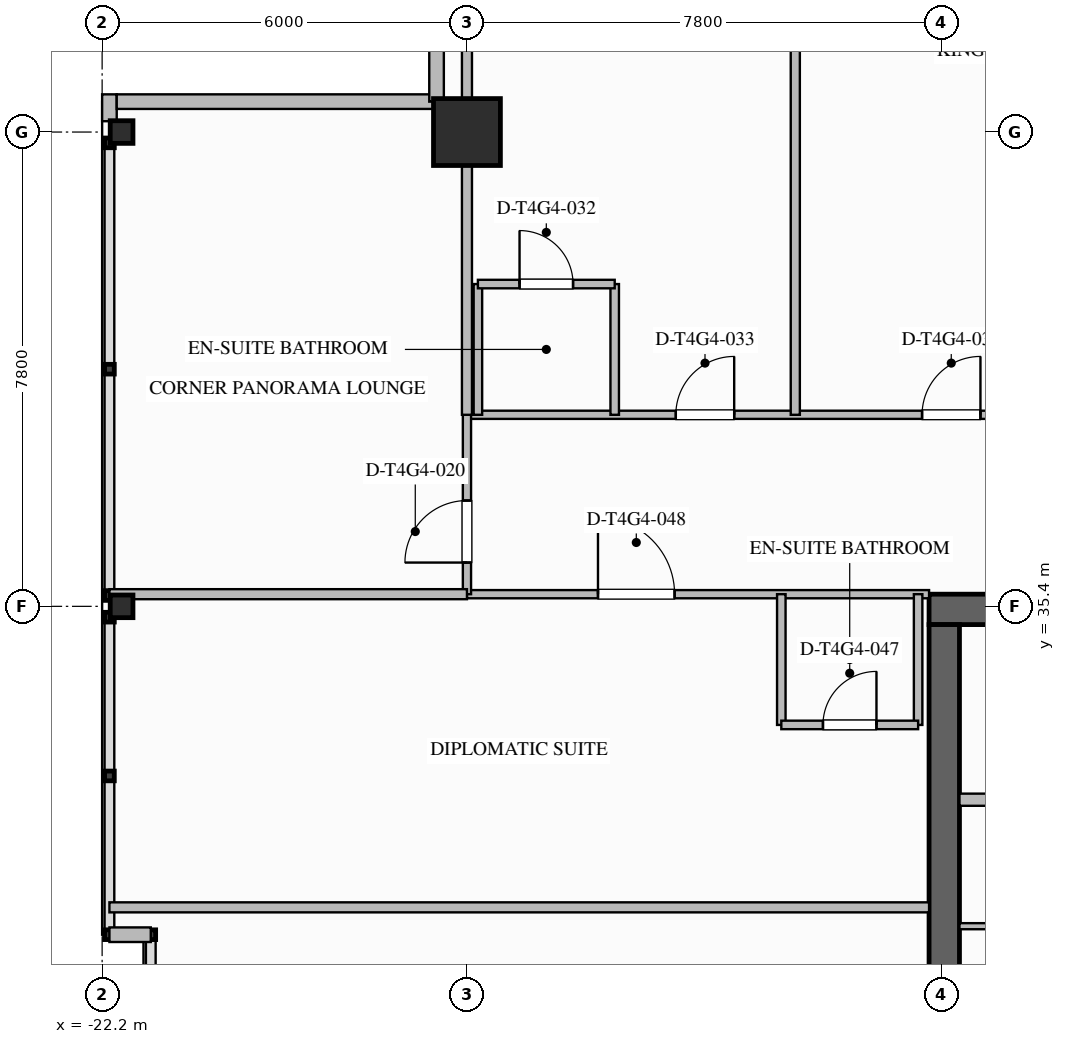
"""IFC4 building model, lengths in metres.
Left out: names, types, materials, properties, quantities, classifications, styles, units other than length and angle.
Written with IfcOpenShell. Run it as: python <this file> out.ifc"""

import sys

from ifc_helpers import new_model, si_unit, direction, frame, frame_2d, origin, origin_2d, place, context, subcontext, project, spatial, rectangle, i_section, extrude, element, fill, save


model = new_model("IFC4")
c1 = context("Model", 3, precision=1e-05, world=origin(), true_north=direction((0.0, 1.0)))
c2 = subcontext(c1, "Body", "Model", "MODEL_VIEW")
j1 = project(units=[si_unit("LENGTHUNIT", "METRE"), si_unit("PLANEANGLEUNIT", "RADIAN")], contexts=[c1])
p1 = place(None, origin())
s1 = spatial("IfcSite", under=j1, at=p1, CompositionType="ELEMENT")
p2 = place(p1, origin())
s2 = spatial("IfcBuilding", under=s1, at=p2, CompositionType="ELEMENT")
p3 = place(p2, frame((0.0, 0.0, 237.5)))
s3 = spatial("IfcBuildingStorey", under=s2, at=p3, CompositionType="ELEMENT", Elevation=237.5)
p4 = place(p3, frame((-8.6, 35.35, 0.0), z_axis=(0.0, 0.0, 1.0), x_axis=(1.0, 0.0, 0.0)))
e1 = element("IfcWall", 1, at=p4, inside=s3, PredefinedType="SHEAR", context=c2, shape_type="SweptSolid", body=[
    extrude(rectangle(XDim=17.2, YDim=0.5, at=frame_2d((8.6, 0.0))), origin(), (0.0, 0.0, 1.0), 3.6),
])
p5 = place(p3, frame((-8.35, 18.9, 0.0), z_axis=(0.0, 0.0, 1.0), x_axis=(0.0, 1.0, 0.0)))
e2 = element("IfcWall", 2, at=p5, inside=s3, PredefinedType="SHEAR", context=c2, shape_type="SweptSolid", body=[
    extrude(rectangle(XDim=16.2, YDim=0.5, at=frame_2d((8.1, 0.0))), origin(), (0.0, 0.0, 1.0), 3.6),
])
p6 = place(p3, frame((-16.2, 43.2, 0.0), z_axis=(0.0, 0.0, 1.0), x_axis=(1.0, 0.0, 0.0)))
e3 = element("IfcColumn", 3, at=p6, inside=s3, PredefinedType="COLUMN", context=c2, shape_type="SweptSolid", body=[
    extrude(rectangle(XDim=1.1, YDim=1.1, at=origin_2d()), origin(), (0.0, 0.0, 1.0), 3.6),
])
for number, where, z_axis, x_axis in (
    (4, (-21.88, 35.4, 0.0), (0.0, 0.0, 1.0), (1.0, 0.0, 0.0)),
    (5, (-21.88, 43.2, 0.0), (0.0, 0.0, 1.0), (1.0, 0.0, 0.0)),
):
    element("IfcColumn", number, at=place(p3, frame(where, z_axis=z_axis, x_axis=x_axis)), inside=s3, PredefinedType="COLUMN", context=c2, shape_type="SweptSolid", body=[
        extrude(i_section(OverallWidth=0.374, OverallDepth=0.372, WebThickness=0.016, FlangeThickness=0.026, FilletRadius=0.025, at=origin_2d()), origin(), (0.0, 0.0, 1.0), 3.597),
    ])
p7 = place(p3, frame((-22.08, 43.378, 0.0), z_axis=(0.0, 0.0, 1.0), x_axis=(0.0, 1.0, 0.0)))
e6 = element("IfcWall", 6, at=p7, inside=s3, PredefinedType="STANDARD", context=c2, shape_type="SweptSolid", body=[
    extrude(rectangle(XDim=0.442, YDim=0.24, at=frame_2d((0.221, 0.0))), origin(), (0.0, 0.0, 1.0), 3.34),
])
for number, where, z_axis, x_axis in (
    (7, (-21.96, 43.7, 0.0), (0.0, 0.0, 1.0), (1.0, 0.0, 0.0)),
    (8, (-16.7, 43.7, 0.0), (0.0, 0.0, 1.0), (0.0, 1.0, 0.0)),
):
    element("IfcWall", number, at=place(p3, frame(where, z_axis=z_axis, x_axis=x_axis)), inside=s3, PredefinedType="STANDARD", context=c2, shape_type="SweptSolid", body=[
        extrude(rectangle(XDim=5.26, YDim=0.24, at=frame_2d((2.63, 0.0))), origin(), (0.0, 0.0, 1.0), 3.34),
    ])
p8 = place(p3, frame((-21.4, 30.0, 0.0), z_axis=(0.0, 0.0, 1.0), x_axis=(-1.0, 0.0, 0.0)))
e9 = element("IfcWall", 9, at=p8, inside=s3, PredefinedType="STANDARD", context=c2, shape_type="SweptSolid", body=[
    extrude(rectangle(XDim=0.68, YDim=0.24, at=frame_2d((0.34, 0.0))), origin(), (0.0, 0.0, 1.0), 3.34),
])
p9 = place(p3, frame((-8.1, 32.22, 0.0), z_axis=(0.0, 0.0, 1.0), x_axis=(1.0, 0.0, 0.0)))
e10 = element("IfcWall", 10, at=p9, inside=s3, PredefinedType="SOLIDWALL", context=c2, shape_type="SweptSolid", body=[
    extrude(rectangle(XDim=7.1, YDim=0.2, at=frame_2d((3.55, 0.0))), origin(), (0.0, 0.0, 1.0), 3.34),
])
p10 = place(p9, frame((0.95, 0.0, 0.0)))
e11 = element("IfcOpeningElement", 11, at=p10, cuts=e10, PredefinedType="OPENING", context=c2, shape_type="SweptSolid", body=[
    extrude(rectangle(XDim=1.1, YDim=2.2, at=frame_2d((0.55, 1.1))), frame((0.0, 0.11, 0.0), z_axis=(0.0, -1.0, 0.0), x_axis=(1.0, 0.0, 0.0)), (0.0, 0.0, 1.0), 0.22),
])
p11 = place(p9, frame((3.27, 0.0, 0.0)))
e12 = element("IfcOpeningElement", 12, at=p11, cuts=e10, PredefinedType="OPENING", context=c2, shape_type="SweptSolid", body=[
    extrude(rectangle(XDim=1.1, YDim=2.2, at=frame_2d((0.55, 1.1))), frame((0.0, 0.11, 0.0), z_axis=(0.0, -1.0, 0.0), x_axis=(1.0, 0.0, 0.0)), (0.0, 0.0, 1.0), 0.22),
])
p12 = place(p9, frame((5.59, 0.0, 0.0)))
e13 = element("IfcOpeningElement", 13, at=p12, cuts=e10, PredefinedType="OPENING", context=c2, shape_type="SweptSolid", body=[
    extrude(rectangle(XDim=1.1, YDim=2.2, at=frame_2d((0.55, 1.1))), frame((0.0, 0.11, 0.0), z_axis=(0.0, -1.0, 0.0), x_axis=(1.0, 0.0, 0.0)), (0.0, 0.0, 1.0), 0.22),
])
p13 = place(p3, frame((-8.1, 30.14, 0.0), z_axis=(0.0, 0.0, 1.0), x_axis=(1.0, 0.0, 0.0)))
e14 = element("IfcWall", 14, at=p13, inside=s3, PredefinedType="PARTITIONING", context=c2, shape_type="SweptSolid", body=[
    extrude(rectangle(XDim=7.1, YDim=0.1, at=frame_2d((3.55, 0.0))), origin(), (0.0, 0.0, 1.0), 3.34),
])
p14 = place(p13, frame((1.1, 0.0, 0.0)))
e15 = element("IfcOpeningElement", 15, at=p14, cuts=e14, PredefinedType="OPENING", context=c2, shape_type="SweptSolid", body=[
    extrude(rectangle(XDim=0.92, YDim=2.1, at=frame_2d((0.46, 1.05))), frame((0.0, 0.06, 0.0), z_axis=(0.0, -1.0, 0.0), x_axis=(1.0, 0.0, 0.0)), (0.0, 0.0, 1.0), 0.12),
])
p15 = place(p13, frame((4.6, 0.0, 0.0)))
e16 = element("IfcOpeningElement", 16, at=p15, cuts=e14, PredefinedType="OPENING", context=c2, shape_type="SweptSolid", body=[
    extrude(rectangle(XDim=0.92, YDim=2.1, at=frame_2d((0.46, 1.05))), frame((0.0, 0.06, 0.0), z_axis=(0.0, -1.0, 0.0), x_axis=(1.0, 0.0, 0.0)), (0.0, 0.0, 1.0), 0.12),
])
p16 = place(p3, frame((-16.2, 38.55, 0.0), z_axis=(0.0, 0.0, 1.0), x_axis=(1.0, 0.0, 0.0)))
e17 = element("IfcWall", 17, at=p16, inside=s3, PredefinedType="PARTITIONING", context=c2, shape_type="SweptSolid", body=[
    extrude(rectangle(XDim=38.28, YDim=0.135, at=frame_2d((19.14, 0.0))), origin(), (0.0, 0.0, 1.0), 3.34),
])
p17 = place(p16, frame((33.355, 0.0, 0.0)))
e18 = element("IfcOpeningElement", 18, at=p17, cuts=e17, PredefinedType="OPENING", context=c2, shape_type="SweptSolid", body=[
    extrude(rectangle(XDim=1.26, YDim=2.2, at=frame_2d((0.63, 1.1))), frame((0.0, 0.077, 0.0), z_axis=(0.0, -1.0, 0.0), x_axis=(1.0, 0.0, 0.0)), (0.0, 0.0, 1.0), 0.155),
])
p18 = place(p16, frame((3.435, 0.0, 0.0)))
e19 = element("IfcOpeningElement", 19, at=p18, cuts=e17, PredefinedType="OPENING", context=c2, shape_type="SweptSolid", body=[
    extrude(rectangle(XDim=0.96, YDim=2.15, at=frame_2d((0.48, 1.075))), frame((0.0, 0.077, 0.0), z_axis=(0.0, -1.0, 0.0), x_axis=(1.0, 0.0, 0.0)), (0.0, 0.0, 1.0), 0.155),
])
p19 = place(p16, frame((7.485, 0.0, 0.0)))
e20 = element("IfcOpeningElement", 20, at=p19, cuts=e17, PredefinedType="OPENING", context=c2, shape_type="SweptSolid", body=[
    extrude(rectangle(XDim=0.96, YDim=2.15, at=frame_2d((0.48, 1.075))), frame((0.0, 0.077, 0.0), z_axis=(0.0, -1.0, 0.0), x_axis=(1.0, 0.0, 0.0)), (0.0, 0.0, 1.0), 0.155),
])
p20 = place(p16, frame((15.69, 0.0, 0.0)))
e21 = element("IfcOpeningElement", 21, at=p20, cuts=e17, PredefinedType="OPENING", context=c2, shape_type="SweptSolid", body=[
    extrude(rectangle(XDim=1.02, YDim=2.15, at=frame_2d((0.51, 1.075))), frame((0.0, 0.077, 0.0), z_axis=(0.0, -1.0, 0.0), x_axis=(1.0, 0.0, 0.0)), (0.0, 0.0, 1.0), 0.155),
])
p21 = place(p16, frame((21.525, 0.0, 0.0)))
e22 = element("IfcOpeningElement", 22, at=p21, cuts=e17, PredefinedType="OPENING", context=c2, shape_type="SweptSolid", body=[
    extrude(rectangle(XDim=0.96, YDim=2.15, at=frame_2d((0.48, 1.075))), frame((0.0, 0.077, 0.0), z_axis=(0.0, -1.0, 0.0), x_axis=(1.0, 0.0, 0.0)), (0.0, 0.0, 1.0), 0.155),
])
p22 = place(p16, frame((30.435, 0.0, 0.0)))
e23 = element("IfcOpeningElement", 23, at=p22, cuts=e17, PredefinedType="OPENING", context=c2, shape_type="SweptSolid", body=[
    extrude(rectangle(XDim=0.96, YDim=2.15, at=frame_2d((0.48, 1.075))), frame((0.0, 0.077, 0.0), z_axis=(0.0, -1.0, 0.0), x_axis=(1.0, 0.0, 0.0)), (0.0, 0.0, 1.0), 0.155),
])
p23 = place(p3, frame((-16.2, 35.6, 0.0), z_axis=(0.0, 0.0, 1.0), x_axis=(1.0, 0.0, 0.0)))
e24 = element("IfcWall", 24, at=p23, inside=s3, PredefinedType="PARTITIONING", context=c2, shape_type="SweptSolid", body=[
    extrude(rectangle(XDim=7.6, YDim=0.135, at=frame_2d((3.8, 0.0))), origin(), (0.0, 0.0, 1.0), 2.717),
])
p24 = place(p23, frame((2.155, 0.0, 0.0)))
e25 = element("IfcOpeningElement", 25, at=p24, cuts=e24, PredefinedType="OPENING", context=c2, shape_type="SweptSolid", body=[
    extrude(rectangle(XDim=1.26, YDim=2.2, at=frame_2d((0.63, 1.1))), frame((0.0, 0.077, 0.0), z_axis=(0.0, -1.0, 0.0), x_axis=(1.0, 0.0, 0.0)), (0.0, 0.0, 1.0), 0.155),
])
p25 = place(p3, frame((-16.2, 35.6, 0.0), z_axis=(0.0, 0.0, 1.0), x_axis=(0.0, 1.0, 0.0)))
e26 = element("IfcWall", 26, at=p25, inside=s3, PredefinedType="PARTITIONING", context=c2, shape_type="SweptSolid", body=[
    extrude(rectangle(XDim=2.95, YDim=0.135, at=frame_2d((1.475, 0.0))), origin(), (0.0, 0.0, 1.0), 2.714),
])
p26 = place(p25, frame((0.52, 0.0, 0.0)))
e27 = element("IfcOpeningElement", 27, at=p26, cuts=e26, PredefinedType="OPENING", context=c2, shape_type="SweptSolid", body=[
    extrude(rectangle(XDim=1.02, YDim=2.15, at=frame_2d((0.51, 1.075))), frame((0.0, 0.077, 0.0), z_axis=(0.0, -1.0, 0.0), x_axis=(1.0, 0.0, 0.0)), (0.0, 0.0, 1.0), 0.155),
])
p27 = place(p3, frame((-16.2, 38.55, 0.0), z_axis=(0.0, 0.0, 1.0), x_axis=(0.0, 1.0, 0.0)))
e28 = element("IfcWall", 28, at=p27, inside=s3, PredefinedType="PARTITIONING", context=c2, shape_type="SweptSolid", body=[
    extrude(rectangle(XDim=10.53, YDim=0.165, at=frame_2d((5.265, 0.0))), origin(), (0.0, 0.0, 1.0), 2.714),
])
p28 = place(p3, frame((-22.08, 35.6, 0.0), z_axis=(0.0, 0.0, 1.0), x_axis=(1.0, 0.0, 0.0)))
e29 = element("IfcWall", 29, at=p28, inside=s3, PredefinedType="PARTITIONING", context=c2, shape_type="SweptSolid", body=[
    extrude(rectangle(XDim=5.88, YDim=0.165, at=frame_2d((2.94, 0.0))), origin(), (0.0, 0.0, 1.0), 2.714),
])
p29 = place(p3, frame((-16.02, 38.55, 0.0), z_axis=(0.0, 0.0, 1.0), x_axis=(0.0, 1.0, 0.0)))
e30 = element("IfcWall", 30, at=p29, inside=s3, PredefinedType="PLUMBINGWALL", context=c2, shape_type="SweptSolid", body=[
    extrude(rectangle(XDim=2.15, YDim=0.14, at=frame_2d((1.075, 0.0))), origin(), (0.0, 0.0, 1.0), 2.714),
])
p30 = place(p3, frame((-13.77, 38.55, 0.0), z_axis=(0.0, 0.0, 1.0), x_axis=(0.0, 1.0, 0.0)))
e31 = element("IfcWall", 31, at=p30, inside=s3, PredefinedType="PLUMBINGWALL", context=c2, shape_type="SweptSolid", body=[
    extrude(rectangle(XDim=2.15, YDim=0.14, at=frame_2d((1.075, 0.0))), origin(), (0.0, 0.0, 1.0), 3.34),
])
p31 = place(p3, frame((-16.02, 40.7, 0.0), z_axis=(0.0, 0.0, 1.0), x_axis=(1.0, 0.0, 0.0)))
e32 = element("IfcWall", 32, at=p31, inside=s3, PredefinedType="PLUMBINGWALL", context=c2, shape_type="SweptSolid", body=[
    extrude(rectangle(XDim=2.25, YDim=0.14, at=frame_2d((1.125, 0.0))), origin(), (0.0, 0.0, 1.0), 3.34),
])
p32 = place(p31, frame((0.685, 0.0, 0.0)))
e33 = element("IfcOpeningElement", 33, at=p32, cuts=e32, PredefinedType="OPENING", context=c2, shape_type="SweptSolid", body=[
    extrude(rectangle(XDim=0.88, YDim=2.1, at=frame_2d((0.44, 1.05))), frame((0.0, 0.08, 0.0), z_axis=(0.0, -1.0, 0.0), x_axis=(1.0, 0.0, 0.0)), (0.0, 0.0, 1.0), 0.16),
])
p33 = place(p3, frame((-10.8, 38.55, 0.0), z_axis=(0.0, 0.0, 1.0), x_axis=(0.0, 1.0, 0.0)))
e34 = element("IfcWall", 34, at=p33, inside=s3, PredefinedType="PARTITIONING", context=c2, shape_type="SweptSolid", body=[
    extrude(rectangle(XDim=10.53, YDim=0.15, at=frame_2d((5.265, 0.0))), origin(), (0.0, 0.0, 1.0), 3.34),
])
p34 = place(p3, frame((-22.08, 30.45, 0.0), z_axis=(0.0, 0.0, 1.0), x_axis=(1.0, 0.0, 0.0)))
e35 = element("IfcWall", 35, at=p34, inside=s3, PredefinedType="PARTITIONING", context=c2, shape_type="SweptSolid", body=[
    extrude(rectangle(XDim=13.48, YDim=0.165, at=frame_2d((6.74, 0.0))), origin(), (0.0, 0.0, 1.0), 3.34),
])
for number, where, z_axis, x_axis in (
    (36, (-11.03, 35.6, 0.0), (0.0, 0.0, 1.0), (0.0, -1.0, 0.0)),
    (37, (-8.78, 35.6, 0.0), (0.0, 0.0, 1.0), (0.0, -1.0, 0.0)),
):
    element("IfcWall", number, at=place(p3, frame(where, z_axis=z_axis, x_axis=x_axis)), inside=s3, PredefinedType="PLUMBINGWALL", context=c2, shape_type="SweptSolid", body=[
        extrude(rectangle(XDim=2.15, YDim=0.14, at=frame_2d((1.075, 0.0))), origin(), (0.0, 0.0, 1.0), 3.34),
    ])
p35 = place(p3, frame((-11.03, 33.45, 0.0), z_axis=(0.0, 0.0, 1.0), x_axis=(1.0, 0.0, 0.0)))
e38 = element("IfcWall", 38, at=p35, inside=s3, PredefinedType="PLUMBINGWALL", context=c2, shape_type="SweptSolid", body=[
    extrude(rectangle(XDim=2.25, YDim=0.14, at=frame_2d((1.125, 0.0))), origin(), (0.0, 0.0, 1.0), 3.34),
])
p36 = place(p35, frame((0.685, 0.0, 0.0)))
e39 = element("IfcOpeningElement", 39, at=p36, cuts=e38, PredefinedType="OPENING", context=c2, shape_type="SweptSolid", body=[
    extrude(rectangle(XDim=0.88, YDim=2.1, at=frame_2d((0.44, 1.05))), frame((0.0, 0.08, 0.0), z_axis=(0.0, -1.0, 0.0), x_axis=(1.0, 0.0, 0.0)), (0.0, 0.0, 1.0), 0.16),
])
p37 = place(p26, origin())
e40 = element("IfcDoor", 40, at=p37, inside=s3, OperationType="SINGLE_SWING_LEFT", PredefinedType="DOOR", context=c2, shape_type="SweptSolid", body=[
    extrude(rectangle(XDim=1.02, YDim=2.15, at=frame_2d((0.51, 1.075))), frame((0.0, 0.025, 0.0), z_axis=(0.0, -1.0, 0.0), x_axis=(1.0, 0.0, 0.0)), (0.0, 0.0, 1.0), 0.05),
])
fill(e27, e40)
p38 = place(p32, origin())
e41 = element("IfcDoor", 41, at=p38, inside=s3, OperationType="SINGLE_SWING_LEFT", PredefinedType="DOOR", context=c2, shape_type="SweptSolid", body=[
    extrude(rectangle(XDim=0.88, YDim=2.1, at=frame_2d((0.44, 1.05))), frame((0.0, 0.025, 0.0), z_axis=(0.0, -1.0, 0.0), x_axis=(1.0, 0.0, 0.0)), (0.0, 0.0, 1.0), 0.05),
])
fill(e33, e41)
p39 = place(p18, origin())
e42 = element("IfcDoor", 42, at=p39, inside=s3, OperationType="SINGLE_SWING_RIGHT", PredefinedType="DOOR", context=c2, shape_type="SweptSolid", body=[
    extrude(rectangle(XDim=0.96, YDim=2.15, at=frame_2d((0.48, 1.075))), frame((0.0, 0.025, 0.0), z_axis=(0.0, -1.0, 0.0), x_axis=(1.0, 0.0, 0.0)), (0.0, 0.0, 1.0), 0.05),
])
fill(e19, e42)
p40 = place(p19, origin())
e43 = element("IfcDoor", 43, at=p40, inside=s3, OperationType="SINGLE_SWING_RIGHT", PredefinedType="DOOR", context=c2, shape_type="SweptSolid", body=[
    extrude(rectangle(XDim=0.96, YDim=2.15, at=frame_2d((0.48, 1.075))), frame((0.0, 0.025, 0.0), z_axis=(0.0, -1.0, 0.0), x_axis=(1.0, 0.0, 0.0)), (0.0, 0.0, 1.0), 0.05),
])
fill(e20, e43)
p41 = place(p36, origin())
e44 = element("IfcDoor", 44, at=p41, inside=s3, OperationType="SINGLE_SWING_RIGHT", PredefinedType="DOOR", context=c2, shape_type="SweptSolid", body=[
    extrude(rectangle(XDim=0.88, YDim=2.1, at=frame_2d((0.44, 1.05))), frame((0.0, 0.025, 0.0), z_axis=(0.0, -1.0, 0.0), x_axis=(1.0, 0.0, 0.0)), (0.0, 0.0, 1.0), 0.05),
])
fill(e39, e44)
p42 = place(p24, origin())
e45 = element("IfcDoor", 45, at=p42, inside=s3, OperationType="SINGLE_SWING_LEFT", PredefinedType="DOOR", context=c2, shape_type="SweptSolid", body=[
    extrude(rectangle(XDim=1.26, YDim=2.2, at=frame_2d((0.63, 1.1))), frame((0.0, 0.025, 0.0), z_axis=(0.0, -1.0, 0.0), x_axis=(1.0, 0.0, 0.0)), (0.0, 0.0, 1.0), 0.05),
])
fill(e25, e45)
save(model, sys.argv[1])
